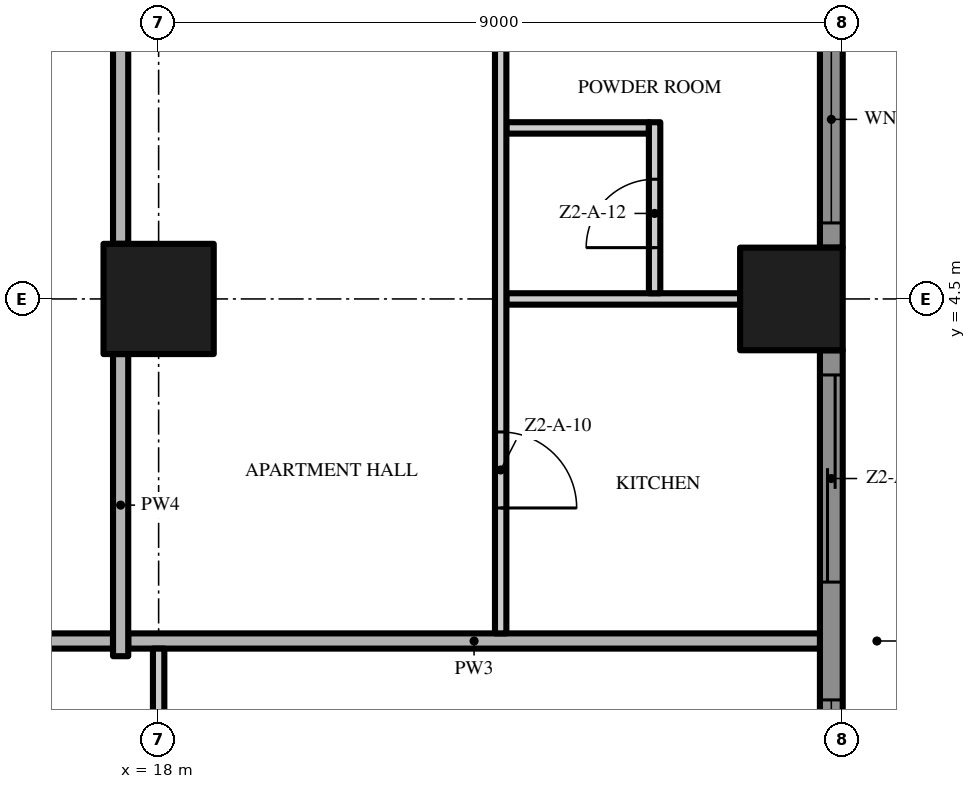
"""IFC4 building model, lengths in metres.
Left out: names, types, materials, properties, quantities, classifications, styles, units other than length and angle.
Written with IfcOpenShell. Run it as: python <this file> out.ifc"""

import sys

from ifc_helpers import new_model, si_unit, direction, frame, frame_2d, origin, origin_2d, place, context, subcontext, project, spatial, polyline, rectangle, outline, extrude, element, fill, save


model = new_model("IFC4")
c1 = context("Model", 3, precision=1e-05, world=origin(), true_north=direction((0.0, 1.0)))
c2 = subcontext(c1, "Body", "Model", "MODEL_VIEW")
j1 = project(units=[si_unit("LENGTHUNIT", "METRE"), si_unit("PLANEANGLEUNIT", "RADIAN")], contexts=[c1])
p1 = place(None, origin())
s1 = spatial("IfcSite", under=j1, at=p1, CompositionType="ELEMENT")
p2 = place(p1, origin())
s2 = spatial("IfcBuilding", under=s1, at=p2, CompositionType="ELEMENT")
p3 = place(p2, frame((0.0, 0.0, 73.2)))
s3 = spatial("IfcBuildingStorey", under=s2, at=p3, CompositionType="ELEMENT", Elevation=73.2)
p4 = place(p3, frame((18.0, 4.5, 0.0), z_axis=(0.0, 0.0, 1.0), x_axis=(1.0, 0.0, 0.0)))
e1 = element("IfcColumn", 1, at=p4, inside=s3, PredefinedType="COLUMN", context=c2, shape_type="SweptSolid", body=[
    extrude(rectangle(XDim=1.45, YDim=1.45, at=origin_2d()), origin(), (0.0, 0.0, 1.0), 3.5),
])
p5 = place(p3, frame((26.325, 4.5, 0.0), z_axis=(0.0, 0.0, 1.0), x_axis=(1.0, 0.0, 0.0)))
e2 = element("IfcColumn", 2, at=p5, inside=s3, PredefinedType="COLUMN", context=c2, shape_type="SweptSolid", body=[
    extrude(rectangle(XDim=1.35, YDim=1.35, at=origin_2d()), origin(), (0.0, 0.0, 1.0), 3.5),
])
p6 = place(p3, frame((26.85, 3.825, 0.0), z_axis=(0.0, 0.0, 1.0), x_axis=(0.0, -1.0, 0.0)))
e3 = element("IfcWall", 3, at=p6, inside=s3, PredefinedType="SOLIDWALL", context=c2, shape_type="SweptSolid", body=[
    extrude(rectangle(XDim=7.65, YDim=0.3, at=frame_2d((3.825, 0.0))), origin(), (0.0, 0.0, 1.0), 3.5),
])
p7 = place(p6, frame((4.6, 0.0, 0.45)))
e4 = element("IfcOpeningElement", 4, at=p7, cuts=e3, PredefinedType="OPENING", context=c2, shape_type="SweptSolid", body=[
    extrude(rectangle(XDim=2.725, YDim=2.65, at=frame_2d((1.363, 1.325))), frame((0.0, 0.16, 0.0), z_axis=(0.0, -1.0, 0.0), x_axis=(1.0, 0.0, 0.0)), (0.0, 0.0, 1.0), 0.32),
])
p8 = place(p6, frame((0.325, 0.0, 0.0)))
e5 = element("IfcOpeningElement", 5, at=p8, cuts=e3, PredefinedType="OPENING", context=c2, shape_type="SweptSolid", body=[
    extrude(rectangle(XDim=2.725, YDim=2.4, at=frame_2d((1.363, 1.2))), frame((0.0, 0.16, 0.0), z_axis=(0.0, -1.0, 0.0), x_axis=(1.0, 0.0, 0.0)), (0.0, 0.0, 1.0), 0.32),
])
p9 = place(p3, frame((26.85, 12.825, 0.0), z_axis=(0.0, 0.0, 1.0), x_axis=(0.0, -1.0, 0.0)))
e6 = element("IfcWall", 6, at=p9, inside=s3, PredefinedType="SOLIDWALL", context=c2, shape_type="SweptSolid", body=[
    extrude(rectangle(XDim=7.65, YDim=0.3, at=frame_2d((3.825, 0.0))), origin(), (0.0, 0.0, 1.0), 3.5),
])
p10 = place(p9, frame((4.6, 0.0, 0.45)))
e7 = element("IfcOpeningElement", 7, at=p10, cuts=e6, PredefinedType="OPENING", context=c2, shape_type="SweptSolid", body=[
    extrude(rectangle(XDim=2.725, YDim=2.65, at=frame_2d((1.363, 1.325))), frame((0.0, 0.16, 0.0), z_axis=(0.0, -1.0, 0.0), x_axis=(1.0, 0.0, 0.0)), (0.0, 0.0, 1.0), 0.32),
])
p11 = place(p9, frame((0.325, 0.0, 0.45)))
e8 = element("IfcOpeningElement", 8, at=p11, cuts=e6, PredefinedType="OPENING", context=c2, shape_type="SweptSolid", body=[
    extrude(rectangle(XDim=2.725, YDim=2.65, at=frame_2d((1.363, 1.325))), frame((0.0, 0.16, 0.0), z_axis=(0.0, -1.0, 0.0), x_axis=(1.0, 0.0, 0.0)), (0.0, 0.0, 1.0), 0.32),
])
p12 = place(p3, origin())
e9 = element("IfcWall", 9, at=p12, inside=s3, PredefinedType="USERDEFINED", context=c2, shape_type="SweptSolid", body=[
    extrude(outline(polyline([(27.951, -18.0), (28.612, -16.5), (29.345, -15.0), (29.869, -13.5), (30.0, -12.375), (29.985, -12.0), (29.649, -10.5), (28.988, -9.0), (28.255, -7.5), (27.731, -6.0), (27.6, -4.875), (27.615, -4.5), (27.951, -3.0), (28.612, -1.5), (29.345, 0.0), (29.869, 1.5), (30.0, 2.625), (29.985, 3.0), (29.649, 4.5), (28.988, 6.0), (28.255, 7.5), (27.731, 9.0), (27.6, 10.125), (27.615, 10.5), (27.951, 12.0), (28.612, 13.5), (29.345, 15.0), (29.869, 16.5), (30.0, 17.625), (29.985, 18.0), (29.735, 17.99), (29.749, 17.635), (29.624, 16.556), (29.114, 15.096), (28.385, 13.605), (27.713, 12.079), (27.366, 10.533), (27.349, 10.115), (27.486, 8.944), (28.024, 7.404), (28.761, 5.895), (29.41, 4.421), (29.736, 2.967), (29.749, 2.635), (29.624, 1.556), (29.114, 0.096), (28.385, -1.395), (27.713, -2.921), (27.366, -4.467), (27.349, -4.885), (27.486, -6.056), (28.024, -7.596), (28.761, -9.105), (29.41, -10.579), (29.736, -12.033), (29.749, -12.365), (29.624, -13.444), (29.114, -14.904), (28.385, -16.395), (27.723, -17.899), (27.951, -18.0)])), origin(), (0.0, 0.0, 1.0), 0.9),
])
p13 = place(p3, frame((4.6, 0.0, 0.0), z_axis=(0.0, 0.0, 1.0), x_axis=(1.0, 0.0, 0.0)))
e10 = element("IfcWall", 10, at=p13, inside=s3, PredefinedType="PARTITIONING", context=c2, shape_type="SweptSolid", body=[
    extrude(rectangle(XDim=12.8, YDim=0.2, at=frame_2d((6.4, 0.0))), origin(), (0.0, 0.0, 1.0), 3.5),
])
p14 = place(p3, frame((17.6, 0.0, 0.0), z_axis=(0.0, 0.0, 1.0), x_axis=(1.0, 0.0, 0.0)))
e11 = element("IfcWall", 11, at=p14, inside=s3, PredefinedType="PARTITIONING", context=c2, shape_type="SweptSolid", body=[
    extrude(rectangle(XDim=9.1, YDim=0.2, at=frame_2d((4.55, 0.0))), origin(), (0.0, 0.0, 1.0), 3.5),
])
p15 = place(p3, frame((22.575, 4.5, 0.0), z_axis=(0.0, 0.0, 1.0), x_axis=(1.0, 0.0, 0.0)))
e12 = element("IfcWall", 12, at=p15, inside=s3, PredefinedType="PARTITIONING", context=c2, shape_type="SweptSolid", body=[
    extrude(rectangle(XDim=3.075, YDim=0.15, at=frame_2d((1.538, 0.0))), origin(), (0.0, 0.0, 1.0), 3.5),
])
p16 = place(p3, frame((22.575, 6.75, 0.0), z_axis=(0.0, 0.0, 1.0), x_axis=(1.0, 0.0, 0.0)))
e13 = element("IfcWall", 13, at=p16, inside=s3, PredefinedType="PARTITIONING", context=c2, shape_type="SweptSolid", body=[
    extrude(rectangle(XDim=1.875, YDim=0.15, at=frame_2d((0.938, 0.0))), origin(), (0.0, 0.0, 1.0), 3.5),
])
p17 = place(p3, frame((17.5, -0.2, 0.0), z_axis=(0.0, 0.0, 1.0), x_axis=(0.0, 1.0, 0.0)))
e14 = element("IfcWall", 14, at=p17, inside=s3, PredefinedType="PARTITIONING", context=c2, shape_type="SweptSolid", body=[
    extrude(rectangle(XDim=3.975, YDim=0.2, at=frame_2d((1.988, 0.0))), origin(), (0.0, 0.0, 1.0), 3.5),
])
p18 = place(p3, frame((17.5, 12.775, 0.0), z_axis=(0.0, 0.0, 1.0), x_axis=(0.0, -1.0, 0.0)))
e15 = element("IfcWall", 15, at=p18, inside=s3, PredefinedType="PARTITIONING", context=c2, shape_type="SweptSolid", body=[
    extrude(rectangle(XDim=7.55, YDim=0.2, at=frame_2d((3.775, 0.0))), origin(), (0.0, 0.0, 1.0), 3.5),
])
p19 = place(p18, frame((3.175, 0.0, 0.0)))
e16 = element("IfcOpeningElement", 16, at=p19, cuts=e15, PredefinedType="OPENING", context=c2, shape_type="SweptSolid", body=[
    extrude(rectangle(XDim=1.2, YDim=2.4, at=frame_2d((0.6, 1.2))), frame((0.0, 0.11, 0.0), z_axis=(0.0, -1.0, 0.0), x_axis=(1.0, 0.0, 0.0)), (0.0, 0.0, 1.0), 0.22),
])
p20 = place(p3, frame((18.0, -0.1, 0.0), z_axis=(0.0, 0.0, 1.0), x_axis=(0.0, -1.0, 0.0)))
e17 = element("IfcWall", 17, at=p20, inside=s3, PredefinedType="PARTITIONING", context=c2, shape_type="SweptSolid", body=[
    extrude(rectangle(XDim=3.675, YDim=0.15, at=frame_2d((1.837, 0.0))), origin(), (0.0, 0.0, 1.0), 3.5),
])
p21 = place(p20, frame((1.675, 0.0, 0.0)))
e18 = element("IfcOpeningElement", 18, at=p21, cuts=e17, PredefinedType="OPENING", context=c2, shape_type="SweptSolid", body=[
    extrude(rectangle(XDim=1.0, YDim=2.4, at=frame_2d((0.5, 1.2))), frame((0.0, 0.085, 0.0), z_axis=(0.0, -1.0, 0.0), x_axis=(1.0, 0.0, 0.0)), (0.0, 0.0, 1.0), 0.17),
])
p22 = place(p3, frame((22.5, 17.325, 0.0), z_axis=(0.0, 0.0, 1.0), x_axis=(0.0, -1.0, 0.0)))
e19 = element("IfcWall", 19, at=p22, inside=s3, PredefinedType="PARTITIONING", context=c2, shape_type="SweptSolid", body=[
    extrude(rectangle(XDim=17.225, YDim=0.15, at=frame_2d((8.613, 0.0))), origin(), (0.0, 0.0, 1.0), 3.5),
])
p23 = place(p22, frame((14.575, 0.0, 0.0)))
e20 = element("IfcOpeningElement", 20, at=p23, cuts=e19, PredefinedType="OPENING", context=c2, shape_type="SweptSolid", body=[
    extrude(rectangle(XDim=1.0, YDim=2.4, at=frame_2d((0.5, 1.2))), frame((0.0, 0.085, 0.0), z_axis=(0.0, -1.0, 0.0), x_axis=(1.0, 0.0, 0.0)), (0.0, 0.0, 1.0), 0.17),
])
p24 = place(p22, frame((7.425, 0.0, 0.0)))
e21 = element("IfcOpeningElement", 21, at=p24, cuts=e19, PredefinedType="OPENING", context=c2, shape_type="SweptSolid", body=[
    extrude(rectangle(XDim=1.8, YDim=2.4, at=frame_2d((0.9, 1.2))), frame((0.0, 0.085, 0.0), z_axis=(0.0, -1.0, 0.0), x_axis=(1.0, 0.0, 0.0)), (0.0, 0.0, 1.0), 0.17),
])
p25 = place(p22, frame((0.15, 0.0, 0.0)))
e22 = element("IfcOpeningElement", 22, at=p25, cuts=e19, PredefinedType="OPENING", context=c2, shape_type="SweptSolid", body=[
    extrude(rectangle(XDim=1.0, YDim=2.4, at=frame_2d((0.5, 1.2))), frame((0.0, 0.085, 0.0), z_axis=(0.0, -1.0, 0.0), x_axis=(1.0, 0.0, 0.0)), (0.0, 0.0, 1.0), 0.17),
])
p26 = place(p3, frame((24.525, 4.575, 0.0), z_axis=(0.0, 0.0, 1.0), x_axis=(0.0, 1.0, 0.0)))
e23 = element("IfcWall", 23, at=p26, inside=s3, PredefinedType="PARTITIONING", context=c2, shape_type="SweptSolid", body=[
    extrude(rectangle(XDim=2.25, YDim=0.15, at=frame_2d((1.125, 0.0))), origin(), (0.0, 0.0, 1.0), 3.5),
])
p27 = place(p26, frame((0.6, 0.0, 0.0)))
e24 = element("IfcOpeningElement", 24, at=p27, cuts=e23, PredefinedType="OPENING", context=c2, shape_type="SweptSolid", body=[
    extrude(rectangle(XDim=0.9, YDim=2.1, at=frame_2d((0.45, 1.05))), frame((0.0, 0.085, 0.0), z_axis=(0.0, -1.0, 0.0), x_axis=(1.0, 0.0, 0.0)), (0.0, 0.0, 1.0), 0.17),
])
p28 = place(p7, origin())
e25 = element("IfcWindow", 25, at=p28, inside=s3, PartitioningType="SINGLE_PANEL", PredefinedType="WINDOW", context=c2, shape_type="SweptSolid", body=[
    extrude(rectangle(XDim=2.725, YDim=2.65, at=frame_2d((1.363, 1.325))), frame((0.0, 0.03, 0.0), z_axis=(0.0, -1.0, 0.0), x_axis=(1.0, 0.0, 0.0)), (0.0, 0.0, 1.0), 0.06),
])
fill(e4, e25)
p29 = place(p8, origin())
e26 = element("IfcDoor", 26, at=p29, inside=s3, OperationType="SINGLE_SWING_LEFT", PredefinedType="DOOR", context=c2, shape_type="SweptSolid", body=[
    extrude(rectangle(XDim=2.725, YDim=2.4, at=frame_2d((1.363, 1.2))), frame((0.0, 0.025, 0.0), z_axis=(0.0, -1.0, 0.0), x_axis=(1.0, 0.0, 0.0)), (0.0, 0.0, 1.0), 0.05),
])
fill(e5, e26)
p30 = place(p10, origin())
e27 = element("IfcWindow", 27, at=p30, inside=s3, PartitioningType="SINGLE_PANEL", PredefinedType="WINDOW", context=c2, shape_type="SweptSolid", body=[
    extrude(rectangle(XDim=2.725, YDim=2.65, at=frame_2d((1.363, 1.325))), frame((0.0, 0.03, 0.0), z_axis=(0.0, -1.0, 0.0), x_axis=(1.0, 0.0, 0.0)), (0.0, 0.0, 1.0), 0.06),
])
fill(e7, e27)
p31 = place(p23, origin())
e28 = element("IfcDoor", 28, at=p31, inside=s3, OperationType="SINGLE_SWING_RIGHT", PredefinedType="DOOR", context=c2, shape_type="SweptSolid", body=[
    extrude(rectangle(XDim=1.0, YDim=2.4, at=frame_2d((0.5, 1.2))), frame((0.0, 0.025, 0.0), z_axis=(0.0, -1.0, 0.0), x_axis=(1.0, 0.0, 0.0)), (0.0, 0.0, 1.0), 0.05),
])
fill(e20, e28)
p32 = place(p27, origin())
e29 = element("IfcDoor", 29, at=p32, inside=s3, OperationType="SINGLE_SWING_LEFT", PredefinedType="DOOR", context=c2, shape_type="SweptSolid", body=[
    extrude(rectangle(XDim=0.9, YDim=2.1, at=frame_2d((0.45, 1.05))), frame((0.0, 0.025, 0.0), z_axis=(0.0, -1.0, 0.0), x_axis=(1.0, 0.0, 0.0)), (0.0, 0.0, 1.0), 0.05),
])
fill(e24, e29)
save(model, sys.argv[1])
